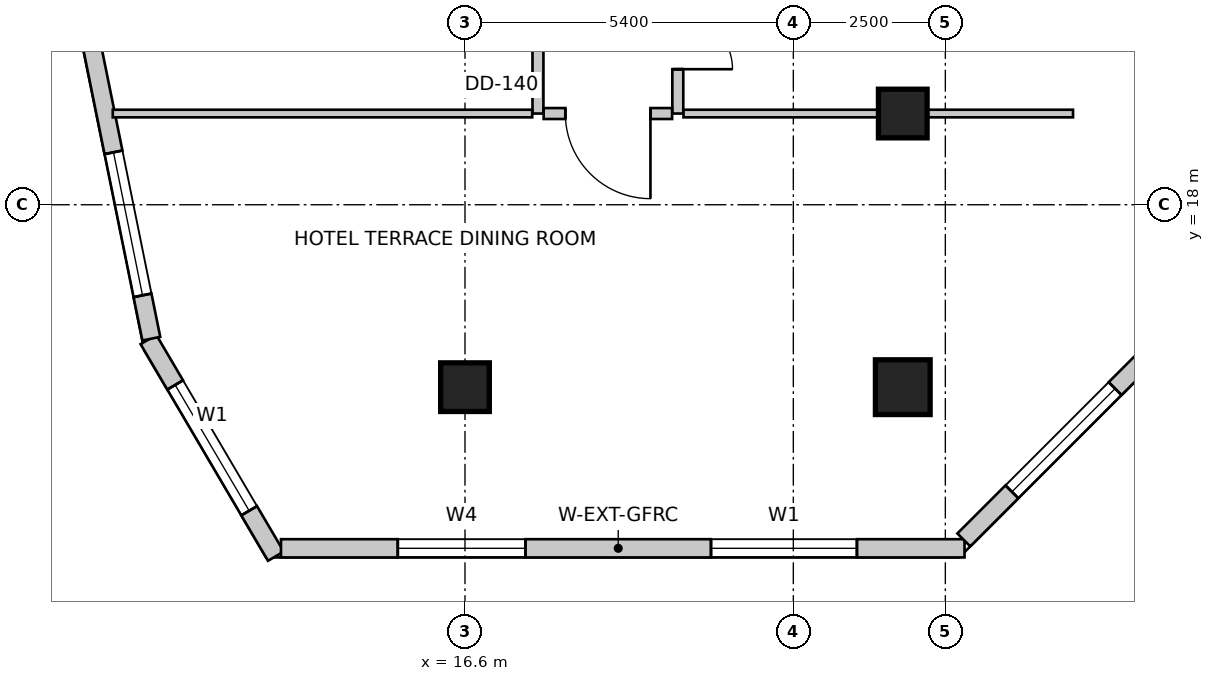
"""IFC4 building model, lengths in metres.
Left out: names, types, materials, properties, quantities, classifications, styles, units other than length and angle.
Written with IfcOpenShell. Run it as: python <this file> out.ifc"""

import sys

from ifc_helpers import new_model, si_unit, direction, frame, frame_2d, origin, origin_2d, place, context, subcontext, project, spatial, rectangle, extrude, source, transform, mapped, element, fill, save


model = new_model("IFC4")
c1 = context("Model", 3, precision=1e-05, world=origin(), true_north=direction((0.0, 1.0)))
c2 = subcontext(c1, "Body", "Model", "MODEL_VIEW")
j1 = project(units=[si_unit("LENGTHUNIT", "METRE"), si_unit("PLANEANGLEUNIT", "RADIAN")], contexts=[c1])
p1 = place(None, origin())
s1 = spatial("IfcSite", under=j1, at=p1, CompositionType="ELEMENT")
p2 = place(p1, origin())
s2 = spatial("IfcBuilding", under=s1, at=p2, CompositionType="ELEMENT")
p3 = place(p2, frame((0.0, 0.0, 143.0)))
s3 = spatial("IfcBuildingStorey", under=s2, at=p3, CompositionType="ELEMENT", Elevation=143.0)
m1 = source(origin(), c2, "Body", "SweptSolid", [
    extrude(rectangle(XDim=0.8, YDim=0.8, at=origin_2d()), origin(), (0.0, 0.0, 1.0), 3.6),
])
p4 = place(p3, frame((23.8, 19.5, 0.0), z_axis=(0.0, 0.0, 1.0), x_axis=(1.0, 0.0, 0.0)))
e1 = element("IfcColumn", 1, at=p4, inside=s3, PredefinedType="COLUMN", context=c2, shape_type="MappedRepresentation", body=[
    mapped(m1, transform((0.0, 0.0, 0.0), scale=1.0)),
])
m2 = source(origin(), c2, "Body", "SweptSolid", [
    extrude(rectangle(XDim=0.9, YDim=0.9, at=origin_2d()), origin(), (0.0, 0.0, 1.0), 3.6),
])
p5 = place(p3, frame((23.8, 15.0, 0.0), z_axis=(0.0, 0.0, 1.0), x_axis=(1.0, 0.0, 0.0)))
e2 = element("IfcColumn", 2, at=p5, inside=s3, PredefinedType="COLUMN", context=c2, shape_type="MappedRepresentation", body=[
    mapped(m2, transform((0.0, 0.0, 0.0), scale=1.0)),
])
p6 = place(p3, frame((16.6, 15.0, 0.0), z_axis=(0.0, 0.0, 1.0), x_axis=(1.0, 0.0, 0.0)))
e3 = element("IfcColumn", 3, at=p6, inside=s3, PredefinedType="COLUMN", context=c2, shape_type="MappedRepresentation", body=[
    mapped(m1, transform((0.0, 0.0, 0.0), scale=1.0)),
])
p7 = place(p3, frame((11.394, 15.784, 0.0), z_axis=(0.0, 0.0, 1.0), x_axis=(0.50698915279, -0.861952434275, 0.0)))
e4 = element("IfcWall", 4, at=p7, inside=s3, PredefinedType="SOLIDWALL", context=c2, shape_type="SweptSolid", body=[
    extrude(rectangle(XDim=4.134, YDim=0.3, at=frame_2d((2.067, 0.0))), origin(), (0.0, 0.0, 1.0), 3.35),
])
m3 = source(origin(), c2, "Body", "SweptSolid", [
    extrude(rectangle(XDim=2.4, YDim=2.2, at=frame_2d((1.2, 1.1))), frame((0.0, 0.16, 0.0), z_axis=(0.0, -1.0, 0.0), x_axis=(1.0, 0.0, 0.0)), (0.0, 0.0, 1.0), 0.32),
])
p8 = place(p7, frame((0.867, 0.0, 0.85)))
e5 = element("IfcOpeningElement", 5, at=p8, cuts=e4, PredefinedType="OPENING", context=c2, shape_type="MappedRepresentation", body=[
    mapped(m3, transform((0.0, 0.0, 0.0), scale=1.0)),
])
p9 = place(p3, frame((13.574, 12.35, 0.0), z_axis=(0.0, 0.0, 1.0), x_axis=(1.0, 0.0, 0.0)))
e6 = element("IfcWall", 6, at=p9, inside=s3, PredefinedType="SOLIDWALL", context=c2, shape_type="SweptSolid", body=[
    extrude(rectangle(XDim=11.242, YDim=0.3, at=frame_2d((5.621, 0.0))), origin(), (0.0, 0.0, 1.0), 3.35),
])
m4 = source(origin(), c2, "Body", "SweptSolid", [
    extrude(rectangle(XDim=2.1, YDim=2.0, at=frame_2d((1.05, 1.0))), frame((0.0, 0.16, 0.0), z_axis=(0.0, -1.0, 0.0), x_axis=(1.0, 0.0, 0.0)), (0.0, 0.0, 1.0), 0.32),
])
p10 = place(p9, frame((1.921, 0.0, 0.85)))
e7 = element("IfcOpeningElement", 7, at=p10, cuts=e6, PredefinedType="OPENING", context=c2, shape_type="MappedRepresentation", body=[
    mapped(m4, transform((0.0, 0.0, 0.0), scale=1.0)),
])
p11 = place(p9, frame((7.072, 0.0, 0.85)))
e8 = element("IfcOpeningElement", 8, at=p11, cuts=e6, PredefinedType="OPENING", context=c2, shape_type="MappedRepresentation", body=[
    mapped(m3, transform((0.0, 0.0, 0.0), scale=1.0)),
])
p12 = place(p3, frame((24.804, 12.488, 0.0), z_axis=(0.0, 0.0, 1.0), x_axis=(0.70708046583, 0.707133095564, 0.0)))
e9 = element("IfcWall", 9, at=p12, inside=s3, PredefinedType="SOLIDWALL", context=c2, shape_type="SweptSolid", body=[
    extrude(rectangle(XDim=4.639, YDim=0.3, at=frame_2d((2.319, 0.0))), origin(), (0.0, 0.0, 1.0), 3.35),
])
p13 = place(p12, frame((1.119, 0.0, 0.85)))
e10 = element("IfcOpeningElement", 10, at=p13, cuts=e9, PredefinedType="OPENING", context=c2, shape_type="MappedRepresentation", body=[
    mapped(m3, transform((0.0, 0.0, 0.0), scale=1.0)),
])
p14 = place(p3, frame((8.187, 31.834, 0.0), z_axis=(0.0, 0.0, 1.0), x_axis=(0.198869838988, -0.980025911464, 0.0)))
e11 = element("IfcWall", 11, at=p14, inside=s3, PredefinedType="SOLIDWALL", context=c2, shape_type="SweptSolid", body=[
    extrude(rectangle(XDim=16.363, YDim=0.3, at=frame_2d((8.182, 0.0))), origin(), (0.0, 0.0, 1.0), 3.35),
])
m5 = source(origin(), c2, "Body", "SweptSolid", [
    extrude(rectangle(XDim=1.5, YDim=1.8, at=frame_2d((0.75, 0.9))), frame((0.0, 0.16, 0.0), z_axis=(0.0, -1.0, 0.0), x_axis=(1.0, 0.0, 0.0)), (0.0, 0.0, 1.0), 0.32),
])
p15 = place(p14, frame((0.981, 0.0, 0.85)))
e12 = element("IfcOpeningElement", 12, at=p15, cuts=e11, PredefinedType="OPENING", context=c2, shape_type="MappedRepresentation", body=[
    mapped(m5, transform((0.0, 0.0, 0.0), scale=1.0)),
])
p16 = place(p14, frame((4.195, 0.0, 0.85)))
e13 = element("IfcOpeningElement", 13, at=p16, cuts=e11, PredefinedType="OPENING", context=c2, shape_type="MappedRepresentation", body=[
    mapped(m3, transform((0.0, 0.0, 0.0), scale=1.0)),
])
p17 = place(p14, frame((9.007, 0.0, 0.85)))
e14 = element("IfcOpeningElement", 14, at=p17, cuts=e11, PredefinedType="OPENING", context=c2, shape_type="MappedRepresentation", body=[
    mapped(m4, transform((0.0, 0.0, 0.0), scale=1.0)),
])
p18 = place(p14, frame((13.236, 0.0, 0.85)))
e15 = element("IfcOpeningElement", 15, at=p18, cuts=e11, PredefinedType="OPENING", context=c2, shape_type="MappedRepresentation", body=[
    mapped(m3, transform((0.0, 0.0, 0.0), scale=1.0)),
])
p19 = place(p3, frame((17.8, 19.5, 0.0), z_axis=(0.0, 0.0, 1.0), x_axis=(0.0, 1.0, 0.0)))
e16 = element("IfcWall", 16, at=p19, inside=s3, PredefinedType="PARTITIONING", context=c2, shape_type="SweptSolid", body=[
    extrude(rectangle(XDim=11.656, YDim=0.18, at=frame_2d((5.828, 0.0))), origin(), (0.0, 0.0, 1.0), 2.803),
])
m6 = source(origin(), c2, "Body", "SweptSolid", [
    extrude(rectangle(XDim=0.9, YDim=2.15, at=frame_2d((0.45, 1.075))), frame((0.0, 0.1, 0.0), z_axis=(0.0, -1.0, 0.0), x_axis=(1.0, 0.0, 0.0)), (0.0, 0.0, 1.0), 0.2),
])
p20 = place(p19, frame((5.378, 0.0, 0.0)))
e17 = element("IfcOpeningElement", 17, at=p20, cuts=e16, PredefinedType="OPENING", context=c2, shape_type="MappedRepresentation", body=[
    mapped(m6, transform((0.0, 0.0, 0.0), scale=1.0)),
])
p21 = place(p3, frame((20.1, 21.858, 0.0), z_axis=(0.0, 0.0, 1.0), x_axis=(0.0, -1.0, 0.0)))
e18 = element("IfcWall", 18, at=p21, inside=s3, PredefinedType="PARTITIONING", context=c2, shape_type="SweptSolid", body=[
    extrude(rectangle(XDim=2.358, YDim=0.18, at=frame_2d((1.179, 0.0))), origin(), (0.0, 0.0, 1.0), 2.922),
])
p22 = place(p21, frame((0.729, 0.0, 0.0)))
e19 = element("IfcOpeningElement", 19, at=p22, cuts=e18, PredefinedType="OPENING", context=c2, shape_type="MappedRepresentation", body=[
    mapped(m6, transform((0.0, 0.0, 0.0), scale=1.0)),
])
p23 = place(p3, frame((20.006, 19.5, 0.0), z_axis=(0.0, 0.0, 1.0), x_axis=(-1.0, 0.0, 0.0)))
e20 = element("IfcWall", 20, at=p23, inside=s3, PredefinedType="PARTITIONING", context=c2, shape_type="SweptSolid", body=[
    extrude(rectangle(XDim=2.112, YDim=0.18, at=frame_2d((1.056, 0.0))), origin(), (0.0, 0.0, 1.0), 3.35),
])
m7 = source(origin(), c2, "Body", "SweptSolid", [
    extrude(rectangle(XDim=1.4, YDim=2.15, at=frame_2d((0.7, 1.075))), frame((0.0, 0.1, 0.0), z_axis=(0.0, -1.0, 0.0), x_axis=(1.0, 0.0, 0.0)), (0.0, 0.0, 1.0), 0.2),
])
p24 = place(p23, frame((0.356, 0.0, 0.0)))
e21 = element("IfcOpeningElement", 21, at=p24, cuts=e20, PredefinedType="OPENING", context=c2, shape_type="MappedRepresentation", body=[
    mapped(m7, transform((0.0, 0.0, 0.0), scale=1.0)),
])
p25 = place(p3, frame((17.706, 19.5, 0.0), z_axis=(0.0, 0.0, 1.0), x_axis=(-1.0, 0.0, 0.0)))
e22 = element("IfcWall", 22, at=p25, inside=s3, PredefinedType="PARTITIONING", context=c2, shape_type="SweptSolid", body=[
    extrude(rectangle(XDim=6.899, YDim=0.125, at=frame_2d((3.45, 0.0))), origin(), (0.0, 0.0, 1.0), 3.35),
])
p26 = place(p3, frame((26.6, 19.5, 0.0), z_axis=(0.0, 0.0, 1.0), x_axis=(-1.0, 0.0, 0.0)))
e23 = element("IfcWall", 23, at=p26, inside=s3, PredefinedType="PARTITIONING", context=c2, shape_type="SweptSolid", body=[
    extrude(rectangle(XDim=6.406, YDim=0.125, at=frame_2d((3.203, 0.0))), origin(), (0.0, 0.0, 1.0), 2.492),
])
m8 = source(origin(), c2, "Body", "SweptSolid", [
    extrude(rectangle(XDim=2.4, YDim=2.2, at=frame_2d((1.2, 1.1))), frame((0.0, -0.015, 0.0), z_axis=(0.0, -1.0, 0.0), x_axis=(1.0, 0.0, 0.0)), (0.0, 0.0, 1.0), 0.06),
])
p27 = place(p8, origin())
e24 = element("IfcWindow", 24, at=p27, inside=s3, PartitioningType="SINGLE_PANEL", PredefinedType="WINDOW", context=c2, shape_type="MappedRepresentation", body=[
    mapped(m8, transform((0.0, 0.0, 0.0), scale=1.0)),
])
fill(e5, e24)
m9 = source(origin(), c2, "Body", "SweptSolid", [
    extrude(rectangle(XDim=2.1, YDim=2.0, at=frame_2d((1.05, 1.0))), frame((0.0, -0.015, 0.0), z_axis=(0.0, -1.0, 0.0), x_axis=(1.0, 0.0, 0.0)), (0.0, 0.0, 1.0), 0.06),
])
p28 = place(p10, origin())
e25 = element("IfcWindow", 25, at=p28, inside=s3, PartitioningType="SINGLE_PANEL", PredefinedType="WINDOW", context=c2, shape_type="MappedRepresentation", body=[
    mapped(m9, transform((0.0, 0.0, 0.0), scale=1.0)),
])
fill(e7, e25)
p29 = place(p11, origin())
e26 = element("IfcWindow", 26, at=p29, inside=s3, PartitioningType="SINGLE_PANEL", PredefinedType="WINDOW", context=c2, shape_type="MappedRepresentation", body=[
    mapped(m8, transform((0.0, 0.0, 0.0), scale=1.0)),
])
fill(e8, e26)
p30 = place(p13, origin())
e27 = element("IfcWindow", 27, at=p30, inside=s3, PartitioningType="SINGLE_PANEL", PredefinedType="WINDOW", context=c2, shape_type="MappedRepresentation", body=[
    mapped(m8, transform((0.0, 0.0, 0.0), scale=1.0)),
])
fill(e10, e27)
p31 = place(p18, origin())
e28 = element("IfcWindow", 28, at=p31, inside=s3, PartitioningType="SINGLE_PANEL", PredefinedType="WINDOW", context=c2, shape_type="MappedRepresentation", body=[
    mapped(m8, transform((0.0, 0.0, 0.0), scale=1.0)),
])
fill(e15, e28)
m10 = source(origin(), c2, "Body", "SweptSolid", [
    extrude(rectangle(XDim=0.9, YDim=2.15, at=frame_2d((0.45, 1.075))), frame((0.0, 0.025, 0.0), z_axis=(0.0, -1.0, 0.0), x_axis=(1.0, 0.0, 0.0)), (0.0, 0.0, 1.0), 0.05),
])
p32 = place(p22, origin())
e29 = element("IfcDoor", 29, at=p32, inside=s3, OperationType="SINGLE_SWING_RIGHT", PredefinedType="DOOR", context=c2, shape_type="MappedRepresentation", body=[
    mapped(m10, transform((0.0, 0.0, 0.0), scale=1.0)),
])
fill(e19, e29)
m11 = source(origin(), c2, "Body", "SweptSolid", [
    extrude(rectangle(XDim=1.4, YDim=2.15, at=frame_2d((0.7, 1.075))), frame((0.0, 0.025, 0.0), z_axis=(0.0, -1.0, 0.0), x_axis=(1.0, 0.0, 0.0)), (0.0, 0.0, 1.0), 0.05),
])
p33 = place(p24, origin())
e30 = element("IfcDoor", 30, at=p33, inside=s3, OperationType="SINGLE_SWING_LEFT", PredefinedType="DOOR", context=c2, shape_type="MappedRepresentation", body=[
    mapped(m11, transform((0.0, 0.0, 0.0), scale=1.0)),
])
fill(e21, e30)
save(model, sys.argv[1])
